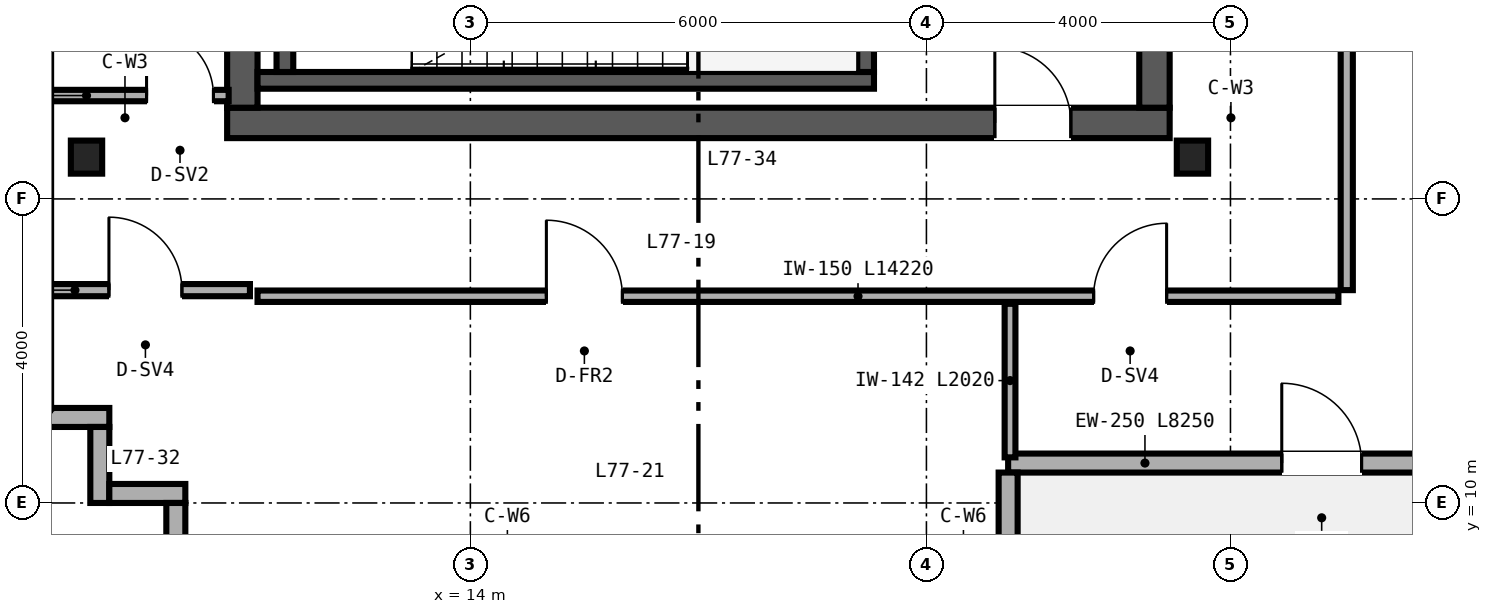
"""IFC4 building model, lengths in metres.
Left out: names, types, materials, properties, quantities, classifications, styles, units other than length and angle.
Written with IfcOpenShell. Run it as: python <this file> out.ifc"""

import sys

from ifc_helpers import new_model, si_unit, direction, frame, frame_2d, origin, origin_2d, place, context, subcontext, project, spatial, rectangle, i_section, extrude, source, transform, mapped, element, fill, save


model = new_model("IFC4")
c1 = context("Model", 3, precision=1e-05, world=origin(), true_north=direction((0.0, 1.0)))
c2 = subcontext(c1, "Body", "Model", "MODEL_VIEW")
j1 = project(units=[si_unit("LENGTHUNIT", "METRE"), si_unit("PLANEANGLEUNIT", "RADIAN")], contexts=[c1])
p1 = place(None, origin())
s1 = spatial("IfcSite", under=j1, at=p1, CompositionType="ELEMENT")
p2 = place(p1, origin())
s2 = spatial("IfcBuilding", under=s1, at=p2, CompositionType="ELEMENT")
p3 = place(p2, frame((0.0, 0.0, 301.2)))
s3 = spatial("IfcBuildingStorey", under=s2, at=p3, CompositionType="ELEMENT", Elevation=301.2)
p4 = place(p3, frame((10.8, 15.0, 0.0), z_axis=(0.0, 0.0, 1.0), x_axis=(1.0, 0.0, 0.0)))
e1 = element("IfcWall", 1, at=p4, inside=s3, PredefinedType="SHEAR", context=c2, shape_type="SweptSolid", body=[
    extrude(rectangle(XDim=12.4, YDim=0.4, at=frame_2d((6.2, 0.0))), origin(), (0.0, 0.0, 1.0), 3.92),
])
p5 = place(p4, frame((10.1, 0.0, 0.0)))
e2 = element("IfcOpeningElement", 2, at=p5, cuts=e1, PredefinedType="OPENING", context=c2, shape_type="SweptSolid", body=[
    extrude(rectangle(XDim=1.0, YDim=2.15, at=frame_2d((0.5, 1.075))), frame((0.0, 0.21, 0.0), z_axis=(0.0, -1.0, 0.0), x_axis=(1.0, 0.0, 0.0)), (0.0, 0.0, 1.0), 0.42),
])
for number, where, z_axis, x_axis in (
    (3, (11.0, 15.2, 0.0), (0.0, 0.0, 1.0), (0.0, 1.0, 0.0)),
    (4, (23.0, 15.2, 0.0), (0.0, 0.0, 1.0), (0.0, 1.0, 0.0)),
):
    element("IfcWall", number, at=place(p3, frame(where, z_axis=z_axis, x_axis=x_axis)), inside=s3, PredefinedType="SHEAR", context=c2, shape_type="SweptSolid", body=[
        extrude(rectangle(XDim=21.6, YDim=0.4, at=frame_2d((10.8, 0.0))), origin(), (0.0, 0.0, 1.0), 3.92),
    ])
p6 = place(p3, frame((11.2, 15.56, 0.0), z_axis=(0.0, 0.0, 1.0), x_axis=(1.0, 0.0, 0.0)))
e5 = element("IfcWall", 5, at=p6, inside=s3, PredefinedType="SHEAR", context=c2, shape_type="SweptSolid", body=[
    extrude(rectangle(XDim=8.11, YDim=0.22, at=frame_2d((4.055, 0.0))), origin(), (0.0, 0.0, 1.0), 4.0),
])
for number, where, z_axis, x_axis in (
    (6, (11.56, 15.67, 0.0), (0.0, 0.0, 1.0), (0.0, 1.0, 0.0)),
    (7, (19.2, 15.67, 0.0), (0.0, 0.0, 1.0), (0.0, 1.0, 0.0)),
):
    element("IfcWall", number, at=place(p3, frame(where, z_axis=z_axis, x_axis=x_axis)), inside=s3, PredefinedType="SHEAR", context=c2, shape_type="SweptSolid", body=[
        extrude(rectangle(XDim=3.28, YDim=0.22, at=frame_2d((1.64, 0.0))), origin(), (0.0, 0.0, 1.0), 4.0),
    ])
m1 = source(origin(), c2, "Body", "SweptSolid", [
    extrude(i_section(OverallWidth=0.412, OverallDepth=0.435, WebThickness=0.036, FlangeThickness=0.057, FilletRadius=0.025, at=origin_2d()), origin(), (0.0, 0.0, 1.0), 3.92),
])
for number, where, z_axis, x_axis in (
    (8, (8.95, 14.55, 0.0), (0.0, 0.0, 1.0), (1.0, 0.0, 0.0)),
    (9, (23.5, 14.55, 0.0), (0.0, 0.0, 1.0), (1.0, 0.0, 0.0)),
):
    element("IfcColumn", number, at=place(p3, frame(where, z_axis=z_axis, x_axis=x_axis)), inside=s3, PredefinedType="COLUMN", context=c2, shape_type="MappedRepresentation", body=[
        mapped(m1, transform((0.0, 0.0, 0.0), scale=1.0)),
    ])
p7 = place(p3, frame((8.0, 11.125, 0.0), z_axis=(0.0, 0.0, 1.0), x_axis=(1.0, 0.0, 0.0)))
e10 = element("IfcWall", 10, at=p7, inside=s3, PredefinedType="SOLIDWALL", context=c2, shape_type="SweptSolid", body=[
    extrude(rectangle(XDim=1.25, YDim=0.25, at=frame_2d((0.625, 0.0))), origin(), (0.0, 0.0, 1.0), 3.92),
])
for number, where, z_axis, x_axis in (
    (11, (9.125, 11.0, 0.0), (0.0, 0.0, 1.0), (0.0, -1.0, 0.0)),
    (12, (9.25, 10.125, 0.0), (0.0, 0.0, 1.0), (1.0, 0.0, 0.0)),
    (13, (10.125, 10.0, 0.0), (0.0, 0.0, 1.0), (0.0, -1.0, 0.0)),
):
    element("IfcWall", number, at=place(p3, frame(where, z_axis=z_axis, x_axis=x_axis)), inside=s3, PredefinedType="SOLIDWALL", context=c2, shape_type="SweptSolid", body=[
        extrude(rectangle(XDim=1.0, YDim=0.25, at=frame_2d((0.5, 0.0))), origin(), (0.0, 0.0, 1.0), 3.92),
    ])
p8 = place(p3, frame((21.075, 10.525, 0.0), z_axis=(0.0, 0.0, 1.0), x_axis=(1.0, 0.0, 0.0)))
e14 = element("IfcWall", 14, at=p8, inside=s3, PredefinedType="SOLIDWALL", context=c2, shape_type="SweptSolid", body=[
    extrude(rectangle(XDim=8.25, YDim=0.25, at=frame_2d((4.125, 0.0))), origin(), (0.0, 0.0, 1.0), 3.92),
])
p9 = place(p8, frame((3.6, 0.0, 0.0)))
e15 = element("IfcOpeningElement", 15, at=p9, cuts=e14, PredefinedType="OPENING", context=c2, shape_type="SweptSolid", body=[
    extrude(rectangle(XDim=1.05, YDim=2.15, at=frame_2d((0.525, 1.075))), frame((0.0, 0.135, 0.0), z_axis=(0.0, -1.0, 0.0), x_axis=(1.0, 0.0, 0.0)), (0.0, 0.0, 1.0), 0.27),
])
p10 = place(p3, frame((21.075, 8.1, 0.0), z_axis=(0.0, 0.0, 1.0), x_axis=(0.0, 1.0, 0.0)))
e16 = element("IfcWall", 16, at=p10, inside=s3, PredefinedType="SOLIDWALL", context=c2, shape_type="SweptSolid", body=[
    extrude(rectangle(XDim=2.3, YDim=0.25, at=frame_2d((1.15, 0.0))), origin(), (0.0, 0.0, 1.0), 3.92),
])
p11 = place(p3, frame((11.2, 12.72, 0.0), z_axis=(0.0, 0.0, 1.0), x_axis=(1.0, 0.0, 0.0)))
e17 = element("IfcWall", 17, at=p11, inside=s3, PredefinedType="PARTITIONING", context=c2, shape_type="SweptSolid", body=[
    extrude(rectangle(XDim=14.22, YDim=0.15, at=frame_2d((7.11, 0.0))), origin(), (0.0, 0.0, 1.0), 3.92),
])
p12 = place(p11, frame((3.8, 0.0, 0.0)))
e18 = element("IfcOpeningElement", 18, at=p12, cuts=e17, PredefinedType="OPENING", context=c2, shape_type="SweptSolid", body=[
    extrude(rectangle(XDim=1.0, YDim=2.15, at=frame_2d((0.5, 1.075))), frame((0.0, 0.085, 0.0), z_axis=(0.0, -1.0, 0.0), x_axis=(1.0, 0.0, 0.0)), (0.0, 0.0, 1.0), 0.17),
])
p13 = place(p11, frame((11.0, 0.0, 0.0)))
e19 = element("IfcOpeningElement", 19, at=p13, cuts=e17, PredefinedType="OPENING", context=c2, shape_type="SweptSolid", body=[
    extrude(rectangle(XDim=0.96, YDim=2.15, at=frame_2d((0.48, 1.075))), frame((0.0, 0.085, 0.0), z_axis=(0.0, -1.0, 0.0), x_axis=(1.0, 0.0, 0.0)), (0.0, 0.0, 1.0), 0.17),
])
p14 = place(p3, frame((21.1, 10.6, 0.0), z_axis=(0.0, 0.0, 1.0), x_axis=(0.0, 1.0, 0.0)))
e20 = element("IfcWall", 20, at=p14, inside=s3, PredefinedType="PARTITIONING", context=c2, shape_type="SweptSolid", body=[
    extrude(rectangle(XDim=2.02, YDim=0.142, at=frame_2d((1.01, 0.0))), origin(), (0.0, 0.0, 1.0), 3.92),
])
p15 = place(p3, frame((25.53, 12.8, 0.0), z_axis=(0.0, 0.0, 1.0), x_axis=(0.0, 1.0, 0.0)))
e21 = element("IfcWall", 21, at=p15, inside=s3, PredefinedType="PARTITIONING", context=c2, shape_type="SweptSolid", body=[
    extrude(rectangle(XDim=26.4, YDim=0.16, at=frame_2d((13.2, 0.0))), origin(), (0.0, 0.0, 1.0), 3.064),
])
p16 = place(p15, frame((4.5, 0.0, 0.0)))
e22 = element("IfcOpeningElement", 22, at=p16, cuts=e21, PredefinedType="OPENING", context=c2, shape_type="SweptSolid", body=[
    extrude(rectangle(XDim=1.1, YDim=2.15, at=frame_2d((0.55, 1.075))), frame((0.0, 0.09, 0.0), z_axis=(0.0, -1.0, 0.0), x_axis=(1.0, 0.0, 0.0)), (0.0, 0.0, 1.0), 0.18),
])
p17 = place(p15, frame((19.5, 0.0, 0.0)))
e23 = element("IfcOpeningElement", 23, at=p17, cuts=e21, PredefinedType="OPENING", context=c2, shape_type="SweptSolid", body=[
    extrude(rectangle(XDim=1.0, YDim=2.15, at=frame_2d((0.5, 1.075))), frame((0.0, 0.09, 0.0), z_axis=(0.0, -1.0, 0.0), x_axis=(1.0, 0.0, 0.0)), (0.0, 0.0, 1.0), 0.18),
])
p18 = place(p3, frame((8.16, 15.36, 0.0), z_axis=(0.0, 0.0, 1.0), x_axis=(1.0, 0.0, 0.0)))
e24 = element("IfcWall", 24, at=p18, inside=s3, PredefinedType="PARTITIONING", context=c2, shape_type="SweptSolid", body=[
    extrude(rectangle(XDim=2.66, YDim=0.15, at=frame_2d((1.33, 0.0))), origin(), (0.0, 0.0, 1.0), 3.141),
])
p19 = place(p18, frame((1.58, 0.0, 0.0)))
e25 = element("IfcOpeningElement", 25, at=p19, cuts=e24, PredefinedType="OPENING", context=c2, shape_type="SweptSolid", body=[
    extrude(rectangle(XDim=0.88, YDim=2.15, at=frame_2d((0.44, 1.075))), frame((0.0, 0.085, 0.0), z_axis=(0.0, -1.0, 0.0), x_axis=(1.0, 0.0, 0.0)), (0.0, 0.0, 1.0), 0.17),
])
p20 = place(p3, frame((8.35, 12.8, 0.0), z_axis=(0.0, 0.0, 1.0), x_axis=(1.0, 0.0, 0.0)))
e26 = element("IfcWall", 26, at=p20, inside=s3, PredefinedType="PARTITIONING", context=c2, shape_type="SweptSolid", body=[
    extrude(rectangle(XDim=2.75, YDim=0.16, at=frame_2d((1.375, 0.0))), origin(), (0.0, 0.0, 1.0), 3.92),
])
p21 = place(p20, frame((0.895, 0.0, 0.0)))
e27 = element("IfcOpeningElement", 27, at=p21, cuts=e26, PredefinedType="OPENING", context=c2, shape_type="SweptSolid", body=[
    extrude(rectangle(XDim=0.96, YDim=2.15, at=frame_2d((0.48, 1.075))), frame((0.0, 0.09, 0.0), z_axis=(0.0, -1.0, 0.0), x_axis=(1.0, 0.0, 0.0)), (0.0, 0.0, 1.0), 0.18),
])
m2 = source(origin(), c2, "Body", "SweptSolid", [
    extrude(rectangle(XDim=1.05, YDim=2.15, at=frame_2d((0.525, 1.075))), frame((0.0, 0.025, 0.0), z_axis=(0.0, -1.0, 0.0), x_axis=(1.0, 0.0, 0.0)), (0.0, 0.0, 1.0), 0.05),
])
p22 = place(p9, origin())
e28 = element("IfcDoor", 28, at=p22, inside=s3, OperationType="SINGLE_SWING_LEFT", PredefinedType="DOOR", context=c2, shape_type="MappedRepresentation", body=[
    mapped(m2, transform((0.0, 0.0, 0.0), scale=1.0)),
])
fill(e15, e28)
m3 = source(origin(), c2, "Body", "SweptSolid", [
    extrude(rectangle(XDim=1.0, YDim=2.15, at=frame_2d((0.5, 1.075))), frame((0.0, 0.025, 0.0), z_axis=(0.0, -1.0, 0.0), x_axis=(1.0, 0.0, 0.0)), (0.0, 0.0, 1.0), 0.05),
])
p23 = place(p5, origin())
e29 = element("IfcDoor", 29, at=p23, inside=s3, OperationType="SINGLE_SWING_LEFT", PredefinedType="DOOR", context=c2, shape_type="MappedRepresentation", body=[
    mapped(m3, transform((0.0, 0.0, 0.0), scale=1.0)),
])
fill(e2, e29)
p24 = place(p12, origin())
e30 = element("IfcDoor", 30, at=p24, inside=s3, OperationType="SINGLE_SWING_LEFT", PredefinedType="DOOR", context=c2, shape_type="MappedRepresentation", body=[
    mapped(m3, transform((0.0, 0.0, 0.0), scale=1.0)),
])
fill(e18, e30)
m4 = source(origin(), c2, "Body", "SweptSolid", [
    extrude(rectangle(XDim=0.96, YDim=2.15, at=frame_2d((0.48, 1.075))), frame((0.0, 0.025, 0.0), z_axis=(0.0, -1.0, 0.0), x_axis=(1.0, 0.0, 0.0)), (0.0, 0.0, 1.0), 0.05),
])
p25 = place(p13, origin())
e31 = element("IfcDoor", 31, at=p25, inside=s3, OperationType="SINGLE_SWING_RIGHT", PredefinedType="DOOR", context=c2, shape_type="MappedRepresentation", body=[
    mapped(m4, transform((0.0, 0.0, 0.0), scale=1.0)),
])
fill(e19, e31)
m5 = source(origin(), c2, "Body", "SweptSolid", [
    extrude(rectangle(XDim=0.88, YDim=2.15, at=frame_2d((0.44, 1.075))), frame((0.0, 0.025, 0.0), z_axis=(0.0, -1.0, 0.0), x_axis=(1.0, 0.0, 0.0)), (0.0, 0.0, 1.0), 0.05),
])
p26 = place(p19, origin())
e32 = element("IfcDoor", 32, at=p26, inside=s3, OperationType="SINGLE_SWING_LEFT", PredefinedType="DOOR", context=c2, shape_type="MappedRepresentation", body=[
    mapped(m5, transform((0.0, 0.0, 0.0), scale=1.0)),
])
fill(e25, e32)
p27 = place(p21, origin())
e33 = element("IfcDoor", 33, at=p27, inside=s3, OperationType="SINGLE_SWING_LEFT", PredefinedType="DOOR", context=c2, shape_type="MappedRepresentation", body=[
    mapped(m4, transform((0.0, 0.0, 0.0), scale=1.0)),
])
fill(e27, e33)
save(model, sys.argv[1])
